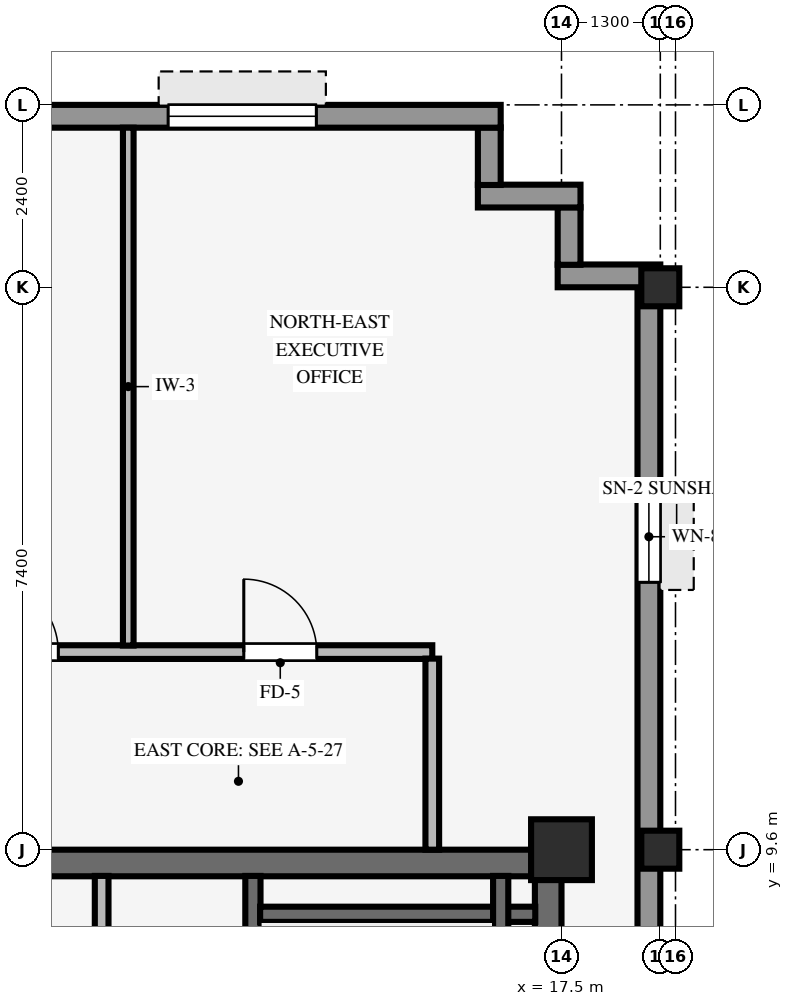
"""IFC4 building model, lengths in metres.
Left out: names, types, materials, properties, quantities, classifications, styles, units other than length and angle.
Written with IfcOpenShell. Run it as: python <this file> out.ifc"""

import sys

from ifc_helpers import new_model, si_unit, direction, frame, frame_2d, origin, origin_2d, place, context, subcontext, project, spatial, rectangle, hollow_rectangle, extrude, source, transform, mapped, element, fill, save


model = new_model("IFC4")
c1 = context("Model", 3, precision=1e-05, world=origin(), true_north=direction((0.0, 1.0)))
c2 = subcontext(c1, "Body", "Model", "MODEL_VIEW")
j1 = project(units=[si_unit("LENGTHUNIT", "METRE"), si_unit("PLANEANGLEUNIT", "RADIAN")], contexts=[c1])
p1 = place(None, origin())
s1 = spatial("IfcSite", under=j1, at=p1, CompositionType="ELEMENT")
p2 = place(p1, origin())
s2 = spatial("IfcBuilding", under=s1, at=p2, CompositionType="ELEMENT")
p3 = place(p2, frame((0.0, 0.0, 276.2)))
s3 = spatial("IfcBuildingStorey", under=s2, at=p3, CompositionType="ELEMENT", Elevation=276.2)
p4 = place(p3, frame((9.0, 9.425, 0.0), z_axis=(0.0, 0.0, 1.0), x_axis=(1.0, 0.0, 0.0)))
e1 = element("IfcWall", 1, at=p4, inside=s3, PredefinedType="SHEAR", context=c2, shape_type="SweptSolid", body=[
    extrude(rectangle(XDim=8.5, YDim=0.35, at=frame_2d((4.25, 0.0))), origin(), (0.0, 0.0, 1.0), 3.37),
])
p5 = place(p3, frame((17.325, -9.255, 0.0), z_axis=(0.0, 0.0, 1.0), x_axis=(0.0, 1.0, 0.0)))
e2 = element("IfcWall", 2, at=p5, inside=s3, PredefinedType="SHEAR", context=c2, shape_type="SweptSolid", body=[
    extrude(rectangle(XDim=18.51, YDim=0.35, at=frame_2d((9.255, 0.0))), origin(), (0.0, 0.0, 1.0), 3.37),
])
p6 = place(p3, frame((17.5, 9.6, 0.0), z_axis=(0.0, 0.0, 1.0), x_axis=(1.0, 0.0, 0.0)))
e3 = element("IfcColumn", 3, at=p6, inside=s3, PredefinedType="COLUMN", context=c2, shape_type="SweptSolid", body=[
    extrude(rectangle(XDim=0.8, YDim=0.8, at=origin_2d()), origin(), (0.0, 0.0, 1.0), 3.37),
])
for number, where, z_axis, x_axis in (
    (4, (18.8, 9.6, 0.0), (0.0, 0.0, 1.0), (1.0, 0.0, 0.0)),
    (5, (18.8, 17.0, 0.0), (0.0, 0.0, 1.0), (1.0, 0.0, 0.0)),
):
    element("IfcColumn", number, at=place(p3, frame(where, z_axis=z_axis, x_axis=x_axis)), inside=s3, PredefinedType="COLUMN", context=c2, shape_type="SweptSolid", body=[
        extrude(hollow_rectangle(XDim=0.5, YDim=0.5, WallThickness=0.032, InnerFilletRadius=0.032, OuterFilletRadius=0.064, at=origin_2d()), origin(), (0.0, 0.0, 1.0), 3.37),
    ])
p7 = place(p3, frame((18.65, -17.004, 0.0), z_axis=(0.0, 0.0, 1.0), x_axis=(0.0, 1.0, 0.0)))
e6 = element("IfcWall", 6, at=p7, inside=s3, PredefinedType="STANDARD", context=c2, shape_type="SweptSolid", body=[
    extrude(rectangle(XDim=34.008, YDim=0.3, at=frame_2d((17.004, 0.0))), origin(), (0.0, 0.0, 1.0), 2.705),
])
p8 = place(p7, frame((2.686, 0.0, 0.8)))
e7 = element("IfcOpeningElement", 7, at=p8, cuts=e6, PredefinedType="OPENING", context=c2, shape_type="SweptSolid", body=[
    extrude(rectangle(XDim=1.2, YDim=1.48, at=frame_2d((0.6, 0.74))), frame((0.0, 0.16, 0.0), z_axis=(0.0, -1.0, 0.0), x_axis=(1.0, 0.0, 0.0)), (0.0, 0.0, 1.0), 0.32),
])
p9 = place(p7, frame((30.122, 0.0, 0.8)))
e8 = element("IfcOpeningElement", 8, at=p9, cuts=e6, PredefinedType="OPENING", context=c2, shape_type="SweptSolid", body=[
    extrude(rectangle(XDim=1.2, YDim=1.48, at=frame_2d((0.6, 0.74))), frame((0.0, 0.16, 0.0), z_axis=(0.0, -1.0, 0.0), x_axis=(1.0, 0.0, 0.0)), (0.0, 0.0, 1.0), 0.32),
])
p10 = place(p3, frame((17.45, 17.15, 0.0), z_axis=(0.0, 0.0, 1.0), x_axis=(1.0, 0.0, 0.0)))
e9 = element("IfcWall", 9, at=p10, inside=s3, PredefinedType="STANDARD", context=c2, shape_type="SweptSolid", body=[
    extrude(rectangle(XDim=1.35, YDim=0.3, at=frame_2d((0.675, 0.0))), origin(), (0.0, 0.0, 1.0), 2.892),
])
p11 = place(p3, frame((17.6, 17.296, 0.0), z_axis=(0.0, 0.0, 1.0), x_axis=(0.0, 1.0, 0.0)))
e10 = element("IfcWall", 10, at=p11, inside=s3, PredefinedType="STANDARD", context=c2, shape_type="SweptSolid", body=[
    extrude(rectangle(XDim=0.758, YDim=0.3, at=frame_2d((0.379, 0.0))), origin(), (0.0, 0.0, 1.0), 2.892),
])
p12 = place(p3, frame((16.4, 18.2, 0.0), z_axis=(0.0, 0.0, 1.0), x_axis=(1.0, 0.0, 0.0)))
e11 = element("IfcWall", 11, at=p12, inside=s3, PredefinedType="STANDARD", context=c2, shape_type="SweptSolid", body=[
    extrude(rectangle(XDim=1.35, YDim=0.3, at=frame_2d((0.675, 0.0))), origin(), (0.0, 0.0, 1.0), 2.892),
])
p13 = place(p3, frame((16.55, 18.346, 0.0), z_axis=(0.0, 0.0, 1.0), x_axis=(0.0, 1.0, 0.0)))
e12 = element("IfcWall", 12, at=p13, inside=s3, PredefinedType="STANDARD", context=c2, shape_type="SweptSolid", body=[
    extrude(rectangle(XDim=0.758, YDim=0.3, at=frame_2d((0.379, 0.0))), origin(), (0.0, 0.0, 1.0), 2.892),
])
p14 = place(p3, frame((-18.9, 19.25, 0.0), z_axis=(0.0, 0.0, 1.0), x_axis=(1.0, 0.0, 0.0)))
e13 = element("IfcWall", 13, at=p14, inside=s3, PredefinedType="STANDARD", context=c2, shape_type="SweptSolid", body=[
    extrude(rectangle(XDim=35.6, YDim=0.3, at=frame_2d((17.8, 0.0))), origin(), (0.0, 0.0, 1.0), 2.705),
])
p15 = place(p14, frame((13.6, 0.0, 0.0)))
e14 = element("IfcOpeningElement", 14, at=p15, cuts=e13, PredefinedType="OPENING", context=c2, shape_type="SweptSolid", body=[
    extrude(rectangle(XDim=0.98, YDim=2.15, at=frame_2d((0.49, 1.075))), frame((0.0, 0.16, 0.0), z_axis=(0.0, -1.0, 0.0), x_axis=(1.0, 0.0, 0.0)), (0.0, 0.0, 1.0), 0.32),
])
p16 = place(p14, frame((2.425, 0.0, 0.8)))
e15 = element("IfcOpeningElement", 15, at=p16, cuts=e13, PredefinedType="OPENING", context=c2, shape_type="SweptSolid", body=[
    extrude(rectangle(XDim=1.95, YDim=1.48, at=frame_2d((0.975, 0.74))), frame((0.0, 0.16, 0.0), z_axis=(0.0, -1.0, 0.0), x_axis=(1.0, 0.0, 0.0)), (0.0, 0.0, 1.0), 0.32),
])
p17 = place(p14, frame((7.225, 0.0, 0.8)))
e16 = element("IfcOpeningElement", 16, at=p17, cuts=e13, PredefinedType="OPENING", context=c2, shape_type="SweptSolid", body=[
    extrude(rectangle(XDim=1.95, YDim=1.48, at=frame_2d((0.975, 0.74))), frame((0.0, 0.16, 0.0), z_axis=(0.0, -1.0, 0.0), x_axis=(1.0, 0.0, 0.0)), (0.0, 0.0, 1.0), 0.32),
])
p18 = place(p14, frame((15.925, 0.0, 0.8)))
e17 = element("IfcOpeningElement", 17, at=p18, cuts=e13, PredefinedType="OPENING", context=c2, shape_type="SweptSolid", body=[
    extrude(rectangle(XDim=1.95, YDim=1.48, at=frame_2d((0.975, 0.74))), frame((0.0, 0.16, 0.0), z_axis=(0.0, -1.0, 0.0), x_axis=(1.0, 0.0, 0.0)), (0.0, 0.0, 1.0), 0.32),
])
p19 = place(p14, frame((21.625, 0.0, 0.8)))
e18 = element("IfcOpeningElement", 18, at=p19, cuts=e13, PredefinedType="OPENING", context=c2, shape_type="SweptSolid", body=[
    extrude(rectangle(XDim=1.95, YDim=1.48, at=frame_2d((0.975, 0.74))), frame((0.0, 0.16, 0.0), z_axis=(0.0, -1.0, 0.0), x_axis=(1.0, 0.0, 0.0)), (0.0, 0.0, 1.0), 0.32),
])
p20 = place(p14, frame((31.225, 0.0, 0.8)))
e19 = element("IfcOpeningElement", 19, at=p20, cuts=e13, PredefinedType="OPENING", context=c2, shape_type="SweptSolid", body=[
    extrude(rectangle(XDim=1.95, YDim=1.48, at=frame_2d((0.975, 0.74))), frame((0.0, 0.16, 0.0), z_axis=(0.0, -1.0, 0.0), x_axis=(1.0, 0.0, 0.0)), (0.0, 0.0, 1.0), 0.32),
])
p21 = place(p3, frame((13.44, 0.9, 0.0), z_axis=(0.0, 0.0, 1.0), x_axis=(0.0, 1.0, 0.0)))
e20 = element("IfcWall", 20, at=p21, inside=s3, PredefinedType="SHEAR", context=c2, shape_type="SweptSolid", body=[
    extrude(rectangle(XDim=8.355, YDim=0.2, at=frame_2d((4.177, 0.0))), origin(), (0.0, 0.0, 1.0), 3.37),
])
p22 = place(p21, frame((0.43, 0.0, 0.0)))
e21 = element("IfcOpeningElement", 21, at=p22, cuts=e20, PredefinedType="OPENING", context=c2, shape_type="SweptSolid", body=[
    extrude(rectangle(XDim=1.1, YDim=2.15, at=frame_2d((0.55, 1.075))), frame((0.0, 0.11, 0.0), z_axis=(0.0, -1.0, 0.0), x_axis=(1.0, 0.0, 0.0)), (0.0, 0.0, 1.0), 0.22),
])
p23 = place(p3, frame((13.535, 8.75, 0.0), z_axis=(0.0, 0.0, 1.0), x_axis=(1.0, 0.0, 0.0)))
e22 = element("IfcWall", 22, at=p23, inside=s3, PredefinedType="SHEAR", context=c2, shape_type="SweptSolid", body=[
    extrude(rectangle(XDim=3.62, YDim=0.2, at=frame_2d((1.81, 0.0))), origin(), (0.0, 0.0, 1.0), 3.37),
])
p24 = place(p3, frame((16.7, 1.095, 0.0), z_axis=(0.0, 0.0, 1.0), x_axis=(0.0, 1.0, 0.0)))
e23 = element("IfcWall", 23, at=p24, inside=s3, PredefinedType="SHEAR", context=c2, shape_type="SweptSolid", body=[
    extrude(rectangle(XDim=8.16, YDim=0.2, at=frame_2d((4.08, 0.0))), origin(), (0.0, 0.0, 1.0), 3.37),
])
p25 = place(p3, frame((11.45, 1.49, 0.0), z_axis=(0.0, 0.0, 1.0), x_axis=(0.0, 1.0, 0.0)))
e24 = element("IfcWall", 24, at=p25, inside=s3, PredefinedType="PARTITIONING", context=c2, shape_type="SweptSolid", body=[
    extrude(rectangle(XDim=7.765, YDim=0.18, at=frame_2d((3.882, 0.0))), origin(), (0.0, 0.0, 1.0), 3.36),
])
p26 = place(p3, frame((-15.0, 12.2, 0.0), z_axis=(0.0, 0.0, 1.0), x_axis=(1.0, 0.0, 0.0)))
e25 = element("IfcWall", 25, at=p26, inside=s3, PredefinedType="PARTITIONING", context=c2, shape_type="SweptSolid", body=[
    extrude(rectangle(XDim=30.8, YDim=0.18, at=frame_2d((15.4, 0.0))), origin(), (0.0, 0.0, 1.0), 3.36),
])
p27 = place(p26, frame((11.52, 0.0, 0.0)))
e26 = element("IfcOpeningElement", 26, at=p27, cuts=e25, PredefinedType="OPENING", context=c2, shape_type="SweptSolid", body=[
    extrude(rectangle(XDim=0.96, YDim=2.1, at=frame_2d((0.48, 1.05))), frame((0.0, 0.1, 0.0), z_axis=(0.0, -1.0, 0.0), x_axis=(1.0, 0.0, 0.0)), (0.0, 0.0, 1.0), 0.2),
])
p28 = place(p26, frame((2.52, 0.0, 0.0)))
e27 = element("IfcOpeningElement", 27, at=p28, cuts=e25, PredefinedType="OPENING", context=c2, shape_type="SweptSolid", body=[
    extrude(rectangle(XDim=0.96, YDim=2.1, at=frame_2d((0.48, 1.05))), frame((0.0, 0.1, 0.0), z_axis=(0.0, -1.0, 0.0), x_axis=(1.0, 0.0, 0.0)), (0.0, 0.0, 1.0), 0.2),
])
p29 = place(p26, frame((28.32, 0.0, 0.0)))
e28 = element("IfcOpeningElement", 28, at=p29, cuts=e25, PredefinedType="OPENING", context=c2, shape_type="SweptSolid", body=[
    extrude(rectangle(XDim=0.96, YDim=2.1, at=frame_2d((0.48, 1.05))), frame((0.0, 0.1, 0.0), z_axis=(0.0, -1.0, 0.0), x_axis=(1.0, 0.0, 0.0)), (0.0, 0.0, 1.0), 0.2),
])
p30 = place(p26, frame((24.92, 0.0, 0.0)))
e29 = element("IfcOpeningElement", 29, at=p30, cuts=e25, PredefinedType="OPENING", context=c2, shape_type="SweptSolid", body=[
    extrude(rectangle(XDim=0.96, YDim=2.1, at=frame_2d((0.48, 1.05))), frame((0.0, 0.1, 0.0), z_axis=(0.0, -1.0, 0.0), x_axis=(1.0, 0.0, 0.0)), (0.0, 0.0, 1.0), 0.2),
])
p31 = place(p26, frame((16.2, 0.0, 0.0)))
e30 = element("IfcOpeningElement", 30, at=p31, cuts=e25, PredefinedType="OPENING", context=c2, shape_type="SweptSolid", body=[
    extrude(rectangle(XDim=0.9, YDim=2.1, at=frame_2d((0.45, 1.05))), frame((0.0, 0.1, 0.0), z_axis=(0.0, -1.0, 0.0), x_axis=(1.0, 0.0, 0.0)), (0.0, 0.0, 1.0), 0.2),
])
p32 = place(p26, frame((18.3, 0.0, 0.0)))
e31 = element("IfcOpeningElement", 31, at=p32, cuts=e25, PredefinedType="OPENING", context=c2, shape_type="SweptSolid", body=[
    extrude(rectangle(XDim=0.9, YDim=2.1, at=frame_2d((0.45, 1.05))), frame((0.0, 0.1, 0.0), z_axis=(0.0, -1.0, 0.0), x_axis=(1.0, 0.0, 0.0)), (0.0, 0.0, 1.0), 0.2),
])
p33 = place(p26, frame((20.25, 0.0, 0.0)))
e32 = element("IfcOpeningElement", 32, at=p33, cuts=e25, PredefinedType="OPENING", context=c2, shape_type="SweptSolid", body=[
    extrude(rectangle(XDim=0.9, YDim=2.1, at=frame_2d((0.45, 1.05))), frame((0.0, 0.1, 0.0), z_axis=(0.0, -1.0, 0.0), x_axis=(1.0, 0.0, 0.0)), (0.0, 0.0, 1.0), 0.2),
])
p34 = place(p3, frame((11.8, 12.286, 0.0), z_axis=(0.0, 0.0, 1.0), x_axis=(0.0, 1.0, 0.0)))
e33 = element("IfcWall", 33, at=p34, inside=s3, PredefinedType="PARTITIONING", context=c2, shape_type="SweptSolid", body=[
    extrude(rectangle(XDim=6.814, YDim=0.14, at=frame_2d((3.407, 0.0))), origin(), (0.0, 0.0, 1.0), 3.36),
])
p35 = place(p3, frame((15.8, 9.6, 0.0), z_axis=(0.0, 0.0, 1.0), x_axis=(0.0, 1.0, 0.0)))
e34 = element("IfcWall", 34, at=p35, inside=s3, PredefinedType="PARTITIONING", context=c2, shape_type="SweptSolid", body=[
    extrude(rectangle(XDim=2.514, YDim=0.18, at=frame_2d((1.257, 0.0))), origin(), (0.0, 0.0, 1.0), 3.36),
])
m1 = source(origin(), c2, "Body", "SweptSolid", [
    extrude(rectangle(XDim=1.2, YDim=1.48, at=frame_2d((0.6, 0.74))), frame((0.0, 0.03, 0.0), z_axis=(0.0, -1.0, 0.0), x_axis=(1.0, 0.0, 0.0)), (0.0, 0.0, 1.0), 0.06),
])
p36 = place(p9, origin())
e35 = element("IfcWindow", 35, at=p36, inside=s3, PartitioningType="SINGLE_PANEL", PredefinedType="WINDOW", context=c2, shape_type="MappedRepresentation", body=[
    mapped(m1, transform((0.0, 0.0, 0.0), scale=1.0)),
])
fill(e8, e35)
m2 = source(origin(), c2, "Body", "SweptSolid", [
    extrude(rectangle(XDim=1.95, YDim=1.48, at=frame_2d((0.975, 0.74))), frame((0.0, 0.03, 0.0), z_axis=(0.0, -1.0, 0.0), x_axis=(1.0, 0.0, 0.0)), (0.0, 0.0, 1.0), 0.06),
])
p37 = place(p20, origin())
e36 = element("IfcWindow", 36, at=p37, inside=s3, PartitioningType="SINGLE_PANEL", PredefinedType="WINDOW", context=c2, shape_type="MappedRepresentation", body=[
    mapped(m2, transform((0.0, 0.0, 0.0), scale=1.0)),
])
fill(e19, e36)
m3 = source(origin(), c2, "Body", "SweptSolid", [
    extrude(rectangle(XDim=0.96, YDim=2.1, at=frame_2d((0.48, 1.05))), frame((0.0, 0.025, 0.0), z_axis=(0.0, -1.0, 0.0), x_axis=(1.0, 0.0, 0.0)), (0.0, 0.0, 1.0), 0.05),
])
p38 = place(p29, origin())
e37 = element("IfcDoor", 37, at=p38, inside=s3, OperationType="SINGLE_SWING_LEFT", PredefinedType="DOOR", context=c2, shape_type="MappedRepresentation", body=[
    mapped(m3, transform((0.0, 0.0, 0.0), scale=1.0)),
])
fill(e28, e37)
p39 = place(p30, origin())
e38 = element("IfcDoor", 38, at=p39, inside=s3, OperationType="SINGLE_SWING_LEFT", PredefinedType="DOOR", context=c2, shape_type="MappedRepresentation", body=[
    mapped(m3, transform((0.0, 0.0, 0.0), scale=1.0)),
])
fill(e29, e38)
save(model, sys.argv[1])
